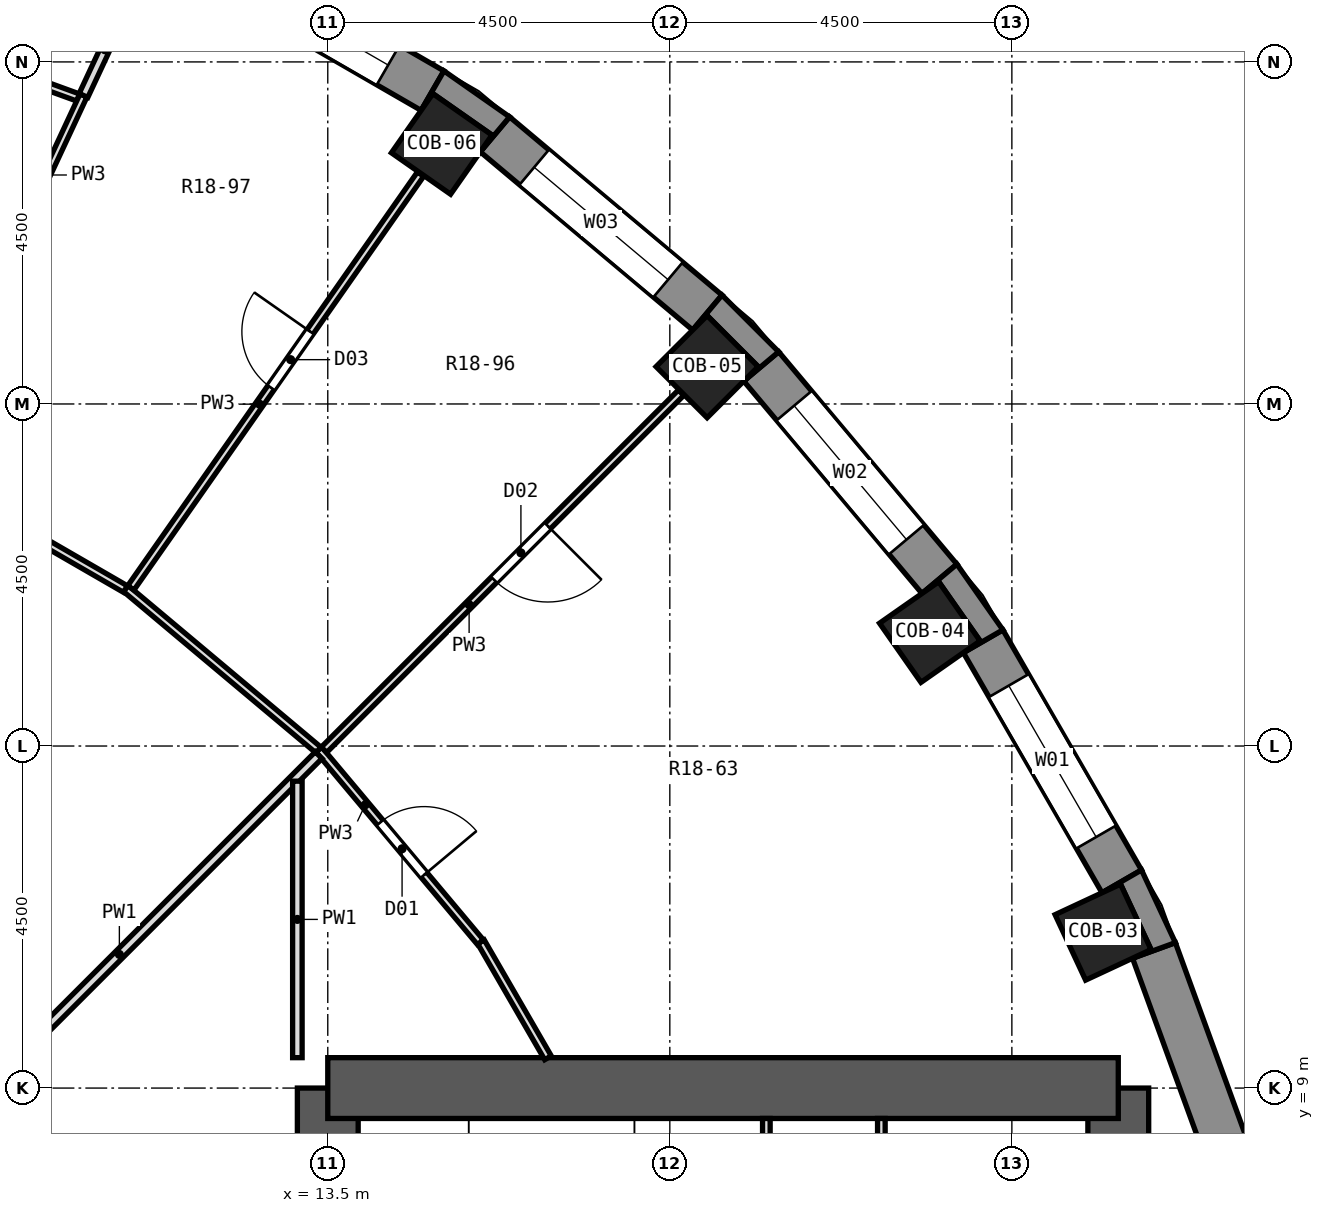
"""IFC4 building model, lengths in metres.
Left out: names, types, materials, properties, quantities, classifications, styles, units other than length and angle.
Written with IfcOpenShell. Run it as: python <this file> out.ifc"""

import sys

from ifc_helpers import new_model, si_unit, direction, frame, frame_2d, origin, origin_2d, place, context, subcontext, project, spatial, polyline, rectangle, outline, extrude, element, fill, save


model = new_model("IFC4")
c1 = context("Model", 3, precision=1e-05, world=origin(), true_north=direction((0.0, 1.0)))
c2 = subcontext(c1, "Body", "Model", "MODEL_VIEW")
j1 = project(units=[si_unit("LENGTHUNIT", "METRE"), si_unit("PLANEANGLEUNIT", "RADIAN")], contexts=[c1])
p1 = place(None, origin())
s1 = spatial("IfcSite", under=j1, at=p1, CompositionType="ELEMENT")
p2 = place(p1, origin())
s2 = spatial("IfcBuilding", under=s1, at=p2, CompositionType="ELEMENT")
p3 = place(p2, frame((0.0, 0.0, 101.8)))
s3 = spatial("IfcBuildingStorey", under=s2, at=p3, CompositionType="ELEMENT", Elevation=101.8)
for number, where, z_axis, x_axis in (
    (1, (23.7, 11.052, 0.0), (0.0, 0.0, 1.0), (0.906, 0.423, 0.0)),
    (2, (21.421, 14.999, 0.0), (0.0, 0.0, 1.0), (0.819, 0.574, 0.0)),
    (3, (18.491, 18.491, 0.0), (0.0, 0.0, 1.0), (0.707, 0.707, 0.0)),
    (4, (14.999, 21.421, 0.0), (0.0, 0.0, 1.0), (0.574, 0.819, 0.0)),
):
    element("IfcColumn", number, at=place(p3, frame(where, z_axis=z_axis, x_axis=x_axis)), inside=s3, PredefinedType="COLUMN", context=c2, shape_type="SweptSolid", body=[
        extrude(rectangle(XDim=0.95, YDim=0.95, at=origin_2d()), origin(), (0.0, 0.0, 1.0), 3.3),
    ])
p4 = place(p3, frame((13.5, -9.0, 0.0), z_axis=(0.0, 0.0, 1.0), x_axis=(0.0, 1.0, 0.0)))
e5 = element("IfcWall", 5, at=p4, inside=s3, PredefinedType="SHEAR", context=c2, shape_type="SweptSolid", body=[
    extrude(rectangle(XDim=18.0, YDim=0.8, at=frame_2d((9.0, 0.0))), origin(), (0.0, 0.0, 1.0), 3.3),
])
p5 = place(p4, frame((15.4, 0.0, 0.0)))
e6 = element("IfcOpeningElement", 6, at=p5, cuts=e5, PredefinedType="OPENING", context=c2, shape_type="SweptSolid", body=[
    extrude(rectangle(XDim=1.2, YDim=2.1, at=frame_2d((0.6, 1.05))), frame((0.0, 0.412, 0.0), z_axis=(0.0, -1.0, 0.0), x_axis=(1.0, 0.0, 0.0)), (0.0, 0.0, 1.0), 0.824),
])
p6 = place(p4, frame((1.4, 0.0, 0.0)))
e7 = element("IfcOpeningElement", 7, at=p6, cuts=e5, PredefinedType="OPENING", context=c2, shape_type="SweptSolid", body=[
    extrude(rectangle(XDim=1.2, YDim=2.1, at=frame_2d((0.6, 1.05))), frame((0.0, 0.412, 0.0), z_axis=(0.0, -1.0, 0.0), x_axis=(1.0, 0.0, 0.0)), (0.0, 0.0, 1.0), 0.824),
])
p7 = place(p4, frame((7.5, 0.0, 0.0)))
e8 = element("IfcOpeningElement", 8, at=p7, cuts=e5, PredefinedType="OPENING", context=c2, shape_type="SweptSolid", body=[
    extrude(rectangle(XDim=3.0, YDim=2.4, at=frame_2d((1.5, 1.2))), frame((0.0, 0.412, 0.0), z_axis=(0.0, -1.0, 0.0), x_axis=(1.0, 0.0, 0.0)), (0.0, 0.0, 1.0), 0.824),
])
p8 = place(p3, frame((23.9, -9.0, 0.0), z_axis=(0.0, 0.0, 1.0), x_axis=(0.0, 1.0, 0.0)))
e9 = element("IfcWall", 9, at=p8, inside=s3, PredefinedType="SHEAR", context=c2, shape_type="SweptSolid", body=[
    extrude(rectangle(XDim=18.0, YDim=0.8, at=frame_2d((9.0, 0.0))), origin(), (0.0, 0.0, 1.0), 3.3),
])
p9 = place(p3, frame((13.5, 9.0, 0.0), z_axis=(0.0, 0.0, 1.0), x_axis=(1.0, 0.0, 0.0)))
e10 = element("IfcWall", 10, at=p9, inside=s3, PredefinedType="SHEAR", context=c2, shape_type="SweptSolid", body=[
    extrude(rectangle(XDim=10.4, YDim=0.8, at=frame_2d((5.2, 0.0))), origin(), (0.0, 0.0, 1.0), 3.3),
])
p10 = place(p3, frame((25.617, 7.383, 0.0), z_axis=(0.0, 0.0, 1.0), x_axis=(-0.341990236633, 0.939703505393, 0.0)))
e11 = element("IfcWall", 11, at=p10, inside=s3, PredefinedType="SOLIDWALL", context=c2, shape_type="SweptSolid", body=[
    extrude(rectangle(XDim=3.648, YDim=0.6, at=frame_2d((1.824, 0.0))), origin(), (0.0, 0.0, 1.0), 2.8),
])
p11 = place(p3, frame((23.946, 11.719, 0.0), z_axis=(0.0, 0.0, 1.0), x_axis=(-0.499954196102, 0.866051847062, 0.0)))
e12 = element("IfcWall", 12, at=p11, inside=s3, PredefinedType="SOLIDWALL", context=c2, shape_type="SweptSolid", body=[
    extrude(rectangle(XDim=3.648, YDim=0.6, at=frame_2d((1.824, 0.0))), origin(), (0.0, 0.0, 1.0), 2.8),
])
p12 = place(p11, frame((0.674, 0.0, 0.9)))
e13 = element("IfcOpeningElement", 13, at=p12, cuts=e12, PredefinedType="OPENING", context=c2, shape_type="SweptSolid", body=[
    extrude(rectangle(XDim=2.3, YDim=1.8, at=frame_2d((1.15, 0.9))), frame((0.0, 0.312, 0.0), z_axis=(0.0, -1.0, 0.0), x_axis=(1.0, 0.0, 0.0)), (0.0, 0.0, 1.0), 0.624),
])
p13 = place(p3, frame((21.547, 15.699, 0.0), z_axis=(0.0, 0.0, 1.0), x_axis=(-0.642774476932, 0.766055462616, 0.0)))
e14 = element("IfcWall", 14, at=p13, inside=s3, PredefinedType="SOLIDWALL", context=c2, shape_type="SweptSolid", body=[
    extrude(rectangle(XDim=3.648, YDim=0.6, at=frame_2d((1.824, 0.0))), origin(), (0.0, 0.0, 1.0), 2.8),
])
p14 = place(p13, frame((0.674, 0.0, 0.9)))
e15 = element("IfcOpeningElement", 15, at=p14, cuts=e14, PredefinedType="OPENING", context=c2, shape_type="SweptSolid", body=[
    extrude(rectangle(XDim=2.3, YDim=1.8, at=frame_2d((1.15, 0.9))), frame((0.0, 0.312, 0.0), z_axis=(0.0, -1.0, 0.0), x_axis=(1.0, 0.0, 0.0)), (0.0, 0.0, 1.0), 0.624),
])
p15 = place(p3, frame((18.494, 19.202, 0.0), z_axis=(0.0, 0.0, 1.0), x_axis=(-0.766055462616, 0.642774476932, 0.0)))
e16 = element("IfcWall", 16, at=p15, inside=s3, PredefinedType="SOLIDWALL", context=c2, shape_type="SweptSolid", body=[
    extrude(rectangle(XDim=3.648, YDim=0.6, at=frame_2d((1.824, 0.0))), origin(), (0.0, 0.0, 1.0), 2.8),
])
p16 = place(p15, frame((0.674, 0.0, 0.9)))
e17 = element("IfcOpeningElement", 17, at=p16, cuts=e16, PredefinedType="OPENING", context=c2, shape_type="SweptSolid", body=[
    extrude(rectangle(XDim=2.3, YDim=1.8, at=frame_2d((1.15, 0.9))), frame((0.0, 0.312, 0.0), z_axis=(0.0, -1.0, 0.0), x_axis=(1.0, 0.0, 0.0)), (0.0, 0.0, 1.0), 0.624),
])
p17 = place(p3, frame((14.878, 22.122, 0.0), z_axis=(0.0, 0.0, 1.0), x_axis=(-0.866051847062, 0.499954196102, 0.0)))
e18 = element("IfcWall", 18, at=p17, inside=s3, PredefinedType="SOLIDWALL", context=c2, shape_type="SweptSolid", body=[
    extrude(rectangle(XDim=3.648, YDim=0.6, at=frame_2d((1.824, 0.0))), origin(), (0.0, 0.0, 1.0), 2.8),
])
p18 = place(p17, frame((0.674, 0.0, 0.9)))
e19 = element("IfcOpeningElement", 19, at=p18, cuts=e18, PredefinedType="OPENING", context=c2, shape_type="SweptSolid", body=[
    extrude(rectangle(XDim=2.3, YDim=1.8, at=frame_2d((1.15, 0.9))), frame((0.0, 0.312, 0.0), z_axis=(0.0, -1.0, 0.0), x_axis=(1.0, 0.0, 0.0)), (0.0, 0.0, 1.0), 0.624),
])
p19 = place(p3, origin())
e20 = element("IfcWall", 20, at=p19, inside=s3, PredefinedType="SOLIDWALL", context=c2, shape_type="SweptSolid", body=[
    extrude(outline(polyline([(24.651, 10.913), (24.206, 11.869), (23.686, 11.569), (23.93, 11.683), (24.331, 10.822), (24.087, 10.708), (24.651, 10.913)])), origin(), (0.0, 0.0, 1.0), 2.8),
])
p20 = place(p3, origin())
e21 = element("IfcWall", 21, at=p20, inside=s3, PredefinedType="SOLIDWALL", context=c2, shape_type="SweptSolid", body=[
    extrude(outline(polyline([(21.777, 15.892), (21.317, 15.506), (21.538, 15.661), (22.083, 14.882), (21.862, 14.728), (22.382, 15.028), (21.777, 15.892)])), origin(), (0.0, 0.0, 1.0), 2.8),
])
p21 = place(p3, origin())
e22 = element("IfcWall", 22, at=p21, inside=s3, PredefinedType="SOLIDWALL", context=c2, shape_type="SweptSolid", body=[
    extrude(outline(polyline([(19.432, 18.686), (18.686, 19.432), (18.301, 18.972), (18.491, 19.163), (19.163, 18.491), (18.972, 18.301), (19.432, 18.686)])), origin(), (0.0, 0.0, 1.0), 2.8),
])
p22 = place(p3, origin())
e23 = element("IfcWall", 23, at=p22, inside=s3, PredefinedType="SOLIDWALL", context=c2, shape_type="SweptSolid", body=[
    extrude(outline(polyline([(15.028, 22.382), (14.728, 21.862), (14.882, 22.083), (15.661, 21.538), (15.506, 21.317), (15.892, 21.777), (15.028, 22.382)])), origin(), (0.0, 0.0, 1.0), 2.8),
])
p23 = place(p3, frame((15.515, 10.925, 0.0), z_axis=(0.0, 0.0, 1.0), x_axis=(0.500277597875, -0.865865073245, 0.0)))
e24 = element("IfcWall", 24, at=p23, inside=s3, PredefinedType="PARTITIONING", context=c2, shape_type="SweptSolid", body=[
    extrude(rectangle(XDim=1.764, YDim=0.1, at=frame_2d((0.882, 0.0))), origin(), (0.0, 0.0, 1.0), 2.8),
])
p24 = place(p3, frame((13.382, 13.454, 0.0), z_axis=(0.0, 0.0, 1.0), x_axis=(0.642584306873, -0.766214988473, 0.0)))
e25 = element("IfcWall", 25, at=p24, inside=s3, PredefinedType="PARTITIONING", context=c2, shape_type="SweptSolid", body=[
    extrude(rectangle(XDim=3.308, YDim=0.1, at=frame_2d((1.654, 0.0))), origin(), (0.0, 0.0, 1.0), 2.8),
])
p25 = place(p24, frame((1.254, 0.0, 0.0)))
e26 = element("IfcOpeningElement", 26, at=p25, cuts=e25, PredefinedType="OPENING", context=c2, shape_type="SweptSolid", body=[
    extrude(rectangle(XDim=0.9, YDim=2.1, at=frame_2d((0.45, 1.05))), frame((0.0, 0.062, 0.0), z_axis=(0.0, -1.0, 0.0), x_axis=(1.0, 0.0, 0.0)), (0.0, 0.0, 1.0), 0.124),
])
p26 = place(p3, frame((10.842, 15.573, 0.0), z_axis=(0.0, 0.0, 1.0), x_axis=(0.76624546285, -0.642547967595, 0.0)))
e27 = element("IfcWall", 27, at=p26, inside=s3, PredefinedType="PARTITIONING", context=c2, shape_type="SweptSolid", body=[
    extrude(rectangle(XDim=3.308, YDim=0.1, at=frame_2d((1.654, 0.0))), origin(), (0.0, 0.0, 1.0), 2.8),
])
p27 = place(p3, frame((7.974, 17.219, 0.0), z_axis=(0.0, 0.0, 1.0), x_axis=(0.865857256379, -0.500291126821, 0.0)))
e28 = element("IfcWall", 28, at=p27, inside=s3, PredefinedType="PARTITIONING", context=c2, shape_type="SweptSolid", body=[
    extrude(rectangle(XDim=3.307, YDim=0.1, at=frame_2d((1.654, 0.0))), origin(), (0.0, 0.0, 1.0), 2.8),
])
p28 = place(p3, frame((7.976, 22.847, 0.0), z_axis=(0.0, 0.0, 1.0), x_axis=(0.939727609181, -0.341923998196, 0.0)))
e29 = element("IfcWall", 29, at=p28, inside=s3, PredefinedType="PARTITIONING", context=c2, shape_type="SweptSolid", body=[
    extrude(rectangle(XDim=2.383, YDim=0.1, at=frame_2d((1.192, 0.0))), origin(), (0.0, 0.0, 1.0), 2.8),
])
p29 = place(p28, frame((0.818, 0.0, 0.0)))
e30 = element("IfcOpeningElement", 30, at=p29, cuts=e29, PredefinedType="OPENING", context=c2, shape_type="SweptSolid", body=[
    extrude(rectangle(XDim=0.8, YDim=2.1, at=frame_2d((0.4, 1.05))), frame((0.0, 0.062, 0.0), z_axis=(0.0, -1.0, 0.0), x_axis=(1.0, 0.0, 0.0)), (0.0, 0.0, 1.0), 0.124),
])
p30 = place(p3, frame((13.45, 13.45, 0.0), z_axis=(0.0, 0.0, 1.0), x_axis=(0.707106781187, 0.707106781187, 0.0)))
e31 = element("IfcWall", 31, at=p30, inside=s3, PredefinedType="PARTITIONING", context=c2, shape_type="SweptSolid", body=[
    extrude(rectangle(XDim=6.643, YDim=0.1, at=frame_2d((3.322, 0.0))), origin(), (0.0, 0.0, 1.0), 2.8),
])
p31 = place(p30, frame((3.164, 0.0, 0.0)))
e32 = element("IfcOpeningElement", 32, at=p31, cuts=e31, PredefinedType="OPENING", context=c2, shape_type="SweptSolid", body=[
    extrude(rectangle(XDim=1.0, YDim=2.1, at=frame_2d((0.5, 1.05))), frame((0.0, 0.062, 0.0), z_axis=(0.0, -1.0, 0.0), x_axis=(1.0, 0.0, 0.0)), (0.0, 0.0, 1.0), 0.124),
])
p32 = place(p3, frame((8.136, 8.136, 0.0), z_axis=(0.0, 0.0, 1.0), x_axis=(0.707106781187, 0.707106781187, 0.0)))
e33 = element("IfcWall", 33, at=p32, inside=s3, PredefinedType="PARTITIONING", context=c2, shape_type="SweptSolid", body=[
    extrude(rectangle(XDim=7.415, YDim=0.125, at=frame_2d((3.708, 0.0))), origin(), (0.0, 0.0, 1.0), 2.8),
])
p33 = place(p3, frame((10.91, 15.581, 0.0), z_axis=(0.0, 0.0, 1.0), x_axis=(0.573558519574, 0.819164589459, 0.0)))
e34 = element("IfcWall", 34, at=p33, inside=s3, PredefinedType="PARTITIONING", context=c2, shape_type="SweptSolid", body=[
    extrude(rectangle(XDim=6.644, YDim=0.1, at=frame_2d((3.322, 0.0))), origin(), (0.0, 0.0, 1.0), 2.8),
])
p34 = place(p33, frame((3.215, 0.0, 0.0)))
e35 = element("IfcOpeningElement", 35, at=p34, cuts=e34, PredefinedType="OPENING", context=c2, shape_type="SweptSolid", body=[
    extrude(rectangle(XDim=0.9, YDim=2.1, at=frame_2d((0.45, 1.05))), frame((0.0, 0.062, 0.0), z_axis=(0.0, -1.0, 0.0), x_axis=(1.0, 0.0, 0.0)), (0.0, 0.0, 1.0), 0.124),
])
p35 = place(p3, frame((9.311, 19.966, 0.0), z_axis=(0.0, 0.0, 1.0), x_axis=(0.422300754366, 0.906455775458, 0.0)))
e36 = element("IfcWall", 36, at=p35, inside=s3, PredefinedType="PARTITIONING", context=c2, shape_type="SweptSolid", body=[
    extrude(rectangle(XDim=2.309, YDim=0.1, at=frame_2d((1.155, 0.0))), origin(), (0.0, 0.0, 1.0), 2.8),
])
p36 = place(p3, frame((10.286, 22.059, 0.0), z_axis=(0.0, 0.0, 1.0), x_axis=(0.422582903395, 0.906324274064, 0.0)))
e37 = element("IfcWall", 37, at=p36, inside=s3, PredefinedType="PARTITIONING", context=c2, shape_type="SweptSolid", body=[
    extrude(rectangle(XDim=1.325, YDim=0.125, at=frame_2d((0.663, 0.0))), origin(), (0.0, 0.0, 1.0), 2.8),
])
p37 = place(p3, frame((13.1, 9.4, 0.0), z_axis=(0.0, 0.0, 1.0), x_axis=(0.0, 1.0, 0.0)))
e38 = element("IfcWall", 38, at=p37, inside=s3, PredefinedType="PARTITIONING", context=c2, shape_type="SweptSolid", body=[
    extrude(rectangle(XDim=3.638, YDim=0.125, at=frame_2d((1.819, 0.0))), origin(), (0.0, 0.0, 1.0), 2.8),
])
p38 = place(p3, frame((19.27, 5.25, 0.0), z_axis=(0.0, 0.0, 1.0), x_axis=(0.0, 1.0, 0.0)))
e39 = element("IfcWall", 39, at=p38, inside=s3, PredefinedType="PARTITIONING", context=c2, shape_type="SweptSolid", body=[
    extrude(rectangle(XDim=3.35, YDim=0.1, at=frame_2d((1.675, 0.0))), origin(), (0.0, 0.0, 1.0), 2.8),
])
p39 = place(p3, frame((20.783, 5.25, 0.0), z_axis=(0.0, 0.0, 1.0), x_axis=(0.0, 1.0, 0.0)))
e40 = element("IfcWall", 40, at=p39, inside=s3, PredefinedType="PARTITIONING", context=c2, shape_type="SweptSolid", body=[
    extrude(rectangle(XDim=3.35, YDim=0.1, at=frame_2d((1.675, 0.0))), origin(), (0.0, 0.0, 1.0), 2.8),
])
p40 = place(p39, frame((1.225, 0.0, 0.0)))
e41 = element("IfcOpeningElement", 41, at=p40, cuts=e40, PredefinedType="OPENING", context=c2, shape_type="SweptSolid", body=[
    extrude(rectangle(XDim=0.9, YDim=2.1, at=frame_2d((0.45, 1.05))), frame((0.0, 0.062, 0.0), z_axis=(0.0, -1.0, 0.0), x_axis=(1.0, 0.0, 0.0)), (0.0, 0.0, 1.0), 0.124),
])
p41 = place(p12, origin())
e42 = element("IfcWindow", 42, at=p41, inside=s3, PartitioningType="SINGLE_PANEL", PredefinedType="WINDOW", context=c2, shape_type="SweptSolid", body=[
    extrude(rectangle(XDim=2.3, YDim=1.8, at=frame_2d((1.15, 0.9))), frame((0.0, 0.18, 0.0), z_axis=(0.0, -1.0, 0.0), x_axis=(1.0, 0.0, 0.0)), (0.0, 0.0, 1.0), 0.06),
])
fill(e13, e42)
p42 = place(p14, origin())
e43 = element("IfcWindow", 43, at=p42, inside=s3, PartitioningType="SINGLE_PANEL", PredefinedType="WINDOW", context=c2, shape_type="SweptSolid", body=[
    extrude(rectangle(XDim=2.3, YDim=1.8, at=frame_2d((1.15, 0.9))), frame((0.0, 0.18, 0.0), z_axis=(0.0, -1.0, 0.0), x_axis=(1.0, 0.0, 0.0)), (0.0, 0.0, 1.0), 0.06),
])
fill(e15, e43)
p43 = place(p16, origin())
e44 = element("IfcWindow", 44, at=p43, inside=s3, PartitioningType="SINGLE_PANEL", PredefinedType="WINDOW", context=c2, shape_type="SweptSolid", body=[
    extrude(rectangle(XDim=2.3, YDim=1.8, at=frame_2d((1.15, 0.9))), frame((0.0, 0.18, 0.0), z_axis=(0.0, -1.0, 0.0), x_axis=(1.0, 0.0, 0.0)), (0.0, 0.0, 1.0), 0.06),
])
fill(e17, e44)
p44 = place(p18, origin())
e45 = element("IfcWindow", 45, at=p44, inside=s3, PartitioningType="SINGLE_PANEL", PredefinedType="WINDOW", context=c2, shape_type="SweptSolid", body=[
    extrude(rectangle(XDim=2.3, YDim=1.8, at=frame_2d((1.15, 0.9))), frame((0.0, 0.18, 0.0), z_axis=(0.0, -1.0, 0.0), x_axis=(1.0, 0.0, 0.0)), (0.0, 0.0, 1.0), 0.06),
])
fill(e19, e45)
p45 = place(p25, origin())
e46 = element("IfcDoor", 46, at=p45, inside=s3, OperationType="SINGLE_SWING_RIGHT", PredefinedType="DOOR", context=c2, shape_type="SweptSolid", body=[
    extrude(rectangle(XDim=0.9, YDim=2.1, at=frame_2d((0.45, 1.05))), frame((0.0, 0.025, 0.0), z_axis=(0.0, -1.0, 0.0), x_axis=(1.0, 0.0, 0.0)), (0.0, 0.0, 1.0), 0.05),
])
fill(e26, e46)
p46 = place(p31, frame((1.0, 0.0, 0.0), z_axis=(0.0, 0.0, 1.0), x_axis=(-1.0, 0.0, 0.0)))
e47 = element("IfcDoor", 47, at=p46, inside=s3, OperationType="SINGLE_SWING_LEFT", PredefinedType="DOOR", context=c2, shape_type="SweptSolid", body=[
    extrude(rectangle(XDim=1.0, YDim=2.1, at=frame_2d((0.5, 1.05))), frame((0.0, 0.025, 0.0), z_axis=(0.0, -1.0, 0.0), x_axis=(1.0, 0.0, 0.0)), (0.0, 0.0, 1.0), 0.05),
])
fill(e32, e47)
p47 = place(p34, origin())
e48 = element("IfcDoor", 48, at=p47, inside=s3, OperationType="SINGLE_SWING_RIGHT", PredefinedType="DOOR", context=c2, shape_type="SweptSolid", body=[
    extrude(rectangle(XDim=0.9, YDim=2.1, at=frame_2d((0.45, 1.05))), frame((0.0, 0.025, 0.0), z_axis=(0.0, -1.0, 0.0), x_axis=(1.0, 0.0, 0.0)), (0.0, 0.0, 1.0), 0.05),
])
fill(e35, e48)
save(model, sys.argv[1])
